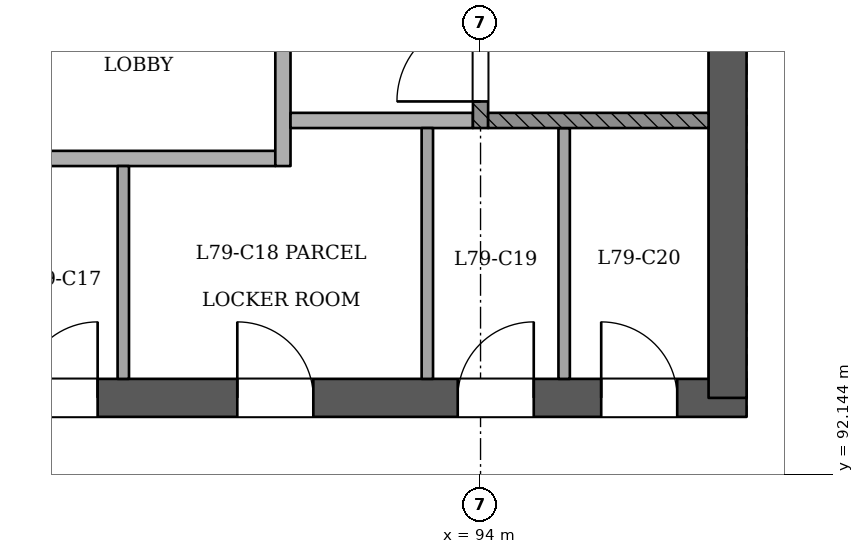
"""IFC4 building model, lengths in metres.
Left out: names, types, materials, properties, quantities, classifications, styles, units other than length and angle.
Written with IfcOpenShell. Run it as: python <this file> out.ifc"""

import sys

from ifc_helpers import new_model, si_unit, direction, frame, frame_2d, origin, place, context, subcontext, project, spatial, rectangle, extrude, element, fill, save


model = new_model("IFC4")
c1 = context("Model", 3, precision=1e-05, world=origin(), true_north=direction((0.0, 1.0)))
c2 = subcontext(c1, "Body", "Model", "MODEL_VIEW")
j1 = project(units=[si_unit("LENGTHUNIT", "METRE"), si_unit("PLANEANGLEUNIT", "RADIAN")], contexts=[c1])
p1 = place(None, origin())
s1 = spatial("IfcSite", under=j1, at=p1, CompositionType="ELEMENT")
p2 = place(p1, origin())
s2 = spatial("IfcBuilding", under=s1, at=p2, CompositionType="ELEMENT")
p3 = place(p2, frame((0.0, 0.0, 305.8)))
s3 = spatial("IfcBuildingStorey", under=s2, at=p3, CompositionType="ELEMENT", Elevation=305.8)
p4 = place(p3, frame((72.75, 93.15, 0.0), z_axis=(0.0, 0.0, 1.0), x_axis=(1.0, 0.0, 0.0)))
e1 = element("IfcWall", 1, at=p4, inside=s3, PredefinedType="SHEAR", context=c2, shape_type="SweptSolid", body=[
    extrude(rectangle(XDim=24.75, YDim=0.5, at=frame_2d((12.375, 0.0))), origin(), (0.0, 0.0, 1.0), 3.6),
])
p5 = place(p4, frame((1.05, 0.0, 0.0)))
e2 = element("IfcOpeningElement", 2, at=p5, cuts=e1, PredefinedType="OPENING", context=c2, shape_type="SweptSolid", body=[
    extrude(rectangle(XDim=1.2, YDim=2.1, at=frame_2d((0.6, 1.05))), frame((0.0, 0.26, 0.0), z_axis=(0.0, -1.0, 0.0), x_axis=(1.0, 0.0, 0.0)), (0.0, 0.0, 1.0), 0.521),
])
p6 = place(p4, frame((3.25, 0.0, 0.0)))
e3 = element("IfcOpeningElement", 3, at=p6, cuts=e1, PredefinedType="OPENING", context=c2, shape_type="SweptSolid", body=[
    extrude(rectangle(XDim=1.2, YDim=2.1, at=frame_2d((0.6, 1.05))), frame((0.0, 0.26, 0.0), z_axis=(0.0, -1.0, 0.0), x_axis=(1.0, 0.0, 0.0)), (0.0, 0.0, 1.0), 0.521),
])
p7 = place(p4, frame((13.25, 0.0, 0.0)))
e4 = element("IfcOpeningElement", 4, at=p7, cuts=e1, PredefinedType="OPENING", context=c2, shape_type="SweptSolid", body=[
    extrude(rectangle(XDim=1.2, YDim=2.1, at=frame_2d((0.6, 1.05))), frame((0.0, 0.26, 0.0), z_axis=(0.0, -1.0, 0.0), x_axis=(1.0, 0.0, 0.0)), (0.0, 0.0, 1.0), 0.521),
])
p8 = place(p4, frame((15.212, 0.0, 0.0)))
e5 = element("IfcOpeningElement", 5, at=p8, cuts=e1, PredefinedType="OPENING", context=c2, shape_type="SweptSolid", body=[
    extrude(rectangle(XDim=1.0, YDim=2.1, at=frame_2d((0.5, 1.05))), frame((0.0, 0.26, 0.0), z_axis=(0.0, -1.0, 0.0), x_axis=(1.0, 0.0, 0.0)), (0.0, 0.0, 1.0), 0.521),
])
p9 = place(p4, frame((18.05, 0.0, 0.0)))
e6 = element("IfcOpeningElement", 6, at=p9, cuts=e1, PredefinedType="OPENING", context=c2, shape_type="SweptSolid", body=[
    extrude(rectangle(XDim=1.0, YDim=2.1, at=frame_2d((0.5, 1.05))), frame((0.0, 0.26, 0.0), z_axis=(0.0, -1.0, 0.0), x_axis=(1.0, 0.0, 0.0)), (0.0, 0.0, 1.0), 0.521),
])
p10 = place(p4, frame((20.95, 0.0, 0.0)))
e7 = element("IfcOpeningElement", 7, at=p10, cuts=e1, PredefinedType="OPENING", context=c2, shape_type="SweptSolid", body=[
    extrude(rectangle(XDim=1.0, YDim=2.1, at=frame_2d((0.5, 1.05))), frame((0.0, 0.26, 0.0), z_axis=(0.0, -1.0, 0.0), x_axis=(1.0, 0.0, 0.0)), (0.0, 0.0, 1.0), 0.521),
])
p11 = place(p4, frame((22.837, 0.0, 0.0)))
e8 = element("IfcOpeningElement", 8, at=p11, cuts=e1, PredefinedType="OPENING", context=c2, shape_type="SweptSolid", body=[
    extrude(rectangle(XDim=1.0, YDim=2.1, at=frame_2d((0.5, 1.05))), frame((0.0, 0.26, 0.0), z_axis=(0.0, -1.0, 0.0), x_axis=(1.0, 0.0, 0.0)), (0.0, 0.0, 1.0), 0.521),
])
p12 = place(p3, frame((97.25, 93.15, 0.0), z_axis=(0.0, 0.0, 1.0), x_axis=(0.0, 1.0, 0.0)))
e9 = element("IfcWall", 9, at=p12, inside=s3, PredefinedType="SHEAR", context=c2, shape_type="SweptSolid", body=[
    extrude(rectangle(XDim=10.75, YDim=0.5, at=frame_2d((5.375, 0.0))), origin(), (0.0, 0.0, 1.0), 3.6),
])
p13 = place(p3, frame((89.3, 93.4, 0.0), z_axis=(0.0, 0.0, 1.0), x_axis=(0.0, 1.0, 0.0)))
e10 = element("IfcWall", 10, at=p13, inside=s3, PredefinedType="PARTITIONING", context=c2, shape_type="SweptSolid", body=[
    extrude(rectangle(XDim=2.8, YDim=0.15, at=frame_2d((1.4, 0.0))), origin(), (0.0, 0.0, 1.0), 3.2),
])
for number, where, z_axis, x_axis in (
    (11, (93.3, 93.4, 0.0), (0.0, 0.0, 1.0), (0.0, 1.0, 0.0)),
    (12, (95.1, 93.4, 0.0), (0.0, 0.0, 1.0), (0.0, 1.0, 0.0)),
):
    element("IfcWall", number, at=place(p3, frame(where, z_axis=z_axis, x_axis=x_axis)), inside=s3, PredefinedType="PARTITIONING", context=c2, shape_type="SweptSolid", body=[
        extrude(rectangle(XDim=3.3, YDim=0.15, at=frame_2d((1.65, 0.0))), origin(), (0.0, 0.0, 1.0), 3.2),
    ])
p14 = place(p3, frame((87.7, 96.3, 0.0), z_axis=(0.0, 0.0, 1.0), x_axis=(1.0, 0.0, 0.0)))
e13 = element("IfcWall", 13, at=p14, inside=s3, PredefinedType="PARTITIONING", context=c2, shape_type="SweptSolid", body=[
    extrude(rectangle(XDim=3.6, YDim=0.2, at=frame_2d((1.8, 0.0))), origin(), (0.0, 0.0, 1.0), 3.2),
])
p15 = place(p3, frame((91.4, 96.2, 0.0), z_axis=(0.0, 0.0, 1.0), x_axis=(0.0, 1.0, 0.0)))
e14 = element("IfcWall", 14, at=p15, inside=s3, PredefinedType="PARTITIONING", context=c2, shape_type="SweptSolid", body=[
    extrude(rectangle(XDim=4.2, YDim=0.2, at=frame_2d((2.1, 0.0))), origin(), (0.0, 0.0, 1.0), 3.2),
])
p16 = place(p15, frame((2.45, 0.0, 0.0)))
e15 = element("IfcOpeningElement", 15, at=p16, cuts=e14, PredefinedType="OPENING", context=c2, shape_type="SweptSolid", body=[
    extrude(rectangle(XDim=1.1, YDim=2.1, at=frame_2d((0.55, 1.05))), frame((0.0, 0.11, 0.0), z_axis=(0.0, -1.0, 0.0), x_axis=(1.0, 0.0, 0.0)), (0.0, 0.0, 1.0), 0.221),
])
p17 = place(p3, frame((91.5, 96.8, 0.0), z_axis=(0.0, 0.0, 1.0), x_axis=(1.0, 0.0, 0.0)))
e16 = element("IfcWall", 16, at=p17, inside=s3, PredefinedType="PARTITIONING", context=c2, shape_type="SweptSolid", body=[
    extrude(rectangle(XDim=2.4, YDim=0.2, at=frame_2d((1.2, 0.0))), origin(), (0.0, 0.0, 1.0), 3.2),
])
p18 = place(p3, frame((94.0, 96.7, 0.0), z_axis=(0.0, 0.0, 1.0), x_axis=(0.0, 1.0, 0.0)))
e17 = element("IfcWall", 17, at=p18, inside=s3, PredefinedType="SOLIDWALL", context=c2, shape_type="SweptSolid", body=[
    extrude(rectangle(XDim=3.7, YDim=0.2, at=frame_2d((1.85, 0.0))), origin(), (0.0, 0.0, 1.0), 3.2),
])
p19 = place(p18, frame((0.35, 0.0, 0.0)))
e18 = element("IfcOpeningElement", 18, at=p19, cuts=e17, PredefinedType="OPENING", context=c2, shape_type="SweptSolid", body=[
    extrude(rectangle(XDim=1.1, YDim=2.1, at=frame_2d((0.55, 1.05))), frame((0.0, 0.11, 0.0), z_axis=(0.0, -1.0, 0.0), x_axis=(1.0, 0.0, 0.0)), (0.0, 0.0, 1.0), 0.221),
])
p20 = place(p3, frame((94.1, 96.8, 0.0), z_axis=(0.0, 0.0, 1.0), x_axis=(1.0, 0.0, 0.0)))
e19 = element("IfcWall", 19, at=p20, inside=s3, PredefinedType="SOLIDWALL", context=c2, shape_type="SweptSolid", body=[
    extrude(rectangle(XDim=2.9, YDim=0.2, at=frame_2d((1.45, 0.0))), origin(), (0.0, 0.0, 1.0), 3.2),
])
p21 = place(p19, origin())
e20 = element("IfcDoor", 20, at=p21, inside=s3, OperationType="SINGLE_SWING_LEFT", PredefinedType="NOTDEFINED", context=c2, shape_type="SweptSolid", body=[
    extrude(rectangle(XDim=1.1, YDim=2.1, at=frame_2d((0.55, 1.05))), frame((0.0, 0.025, 0.0), z_axis=(0.0, -1.0, 0.0), x_axis=(1.0, 0.0, 0.0)), (0.0, 0.0, 1.0), 0.05),
])
fill(e18, e20)
p22 = place(p8, origin())
e21 = element("IfcDoor", 21, at=p22, inside=s3, OperationType="SINGLE_SWING_RIGHT", PredefinedType="NOTDEFINED", context=c2, shape_type="SweptSolid", body=[
    extrude(rectangle(XDim=1.0, YDim=2.1, at=frame_2d((0.5, 1.05))), frame((0.0, 0.025, 0.0), z_axis=(0.0, -1.0, 0.0), x_axis=(1.0, 0.0, 0.0)), (0.0, 0.0, 1.0), 0.05),
])
fill(e5, e21)
p23 = place(p9, origin())
e22 = element("IfcDoor", 22, at=p23, inside=s3, OperationType="SINGLE_SWING_LEFT", PredefinedType="NOTDEFINED", context=c2, shape_type="SweptSolid", body=[
    extrude(rectangle(XDim=1.0, YDim=2.1, at=frame_2d((0.5, 1.05))), frame((0.0, 0.025, 0.0), z_axis=(0.0, -1.0, 0.0), x_axis=(1.0, 0.0, 0.0)), (0.0, 0.0, 1.0), 0.05),
])
fill(e6, e22)
p24 = place(p10, origin())
e23 = element("IfcDoor", 23, at=p24, inside=s3, OperationType="SINGLE_SWING_RIGHT", PredefinedType="NOTDEFINED", context=c2, shape_type="SweptSolid", body=[
    extrude(rectangle(XDim=1.0, YDim=2.1, at=frame_2d((0.5, 1.05))), frame((0.0, 0.025, 0.0), z_axis=(0.0, -1.0, 0.0), x_axis=(1.0, 0.0, 0.0)), (0.0, 0.0, 1.0), 0.05),
])
fill(e7, e23)
p25 = place(p11, origin())
e24 = element("IfcDoor", 24, at=p25, inside=s3, OperationType="SINGLE_SWING_LEFT", PredefinedType="NOTDEFINED", context=c2, shape_type="SweptSolid", body=[
    extrude(rectangle(XDim=1.0, YDim=2.1, at=frame_2d((0.5, 1.05))), frame((0.0, 0.025, 0.0), z_axis=(0.0, -1.0, 0.0), x_axis=(1.0, 0.0, 0.0)), (0.0, 0.0, 1.0), 0.05),
])
fill(e8, e24)
save(model, sys.argv[1])
